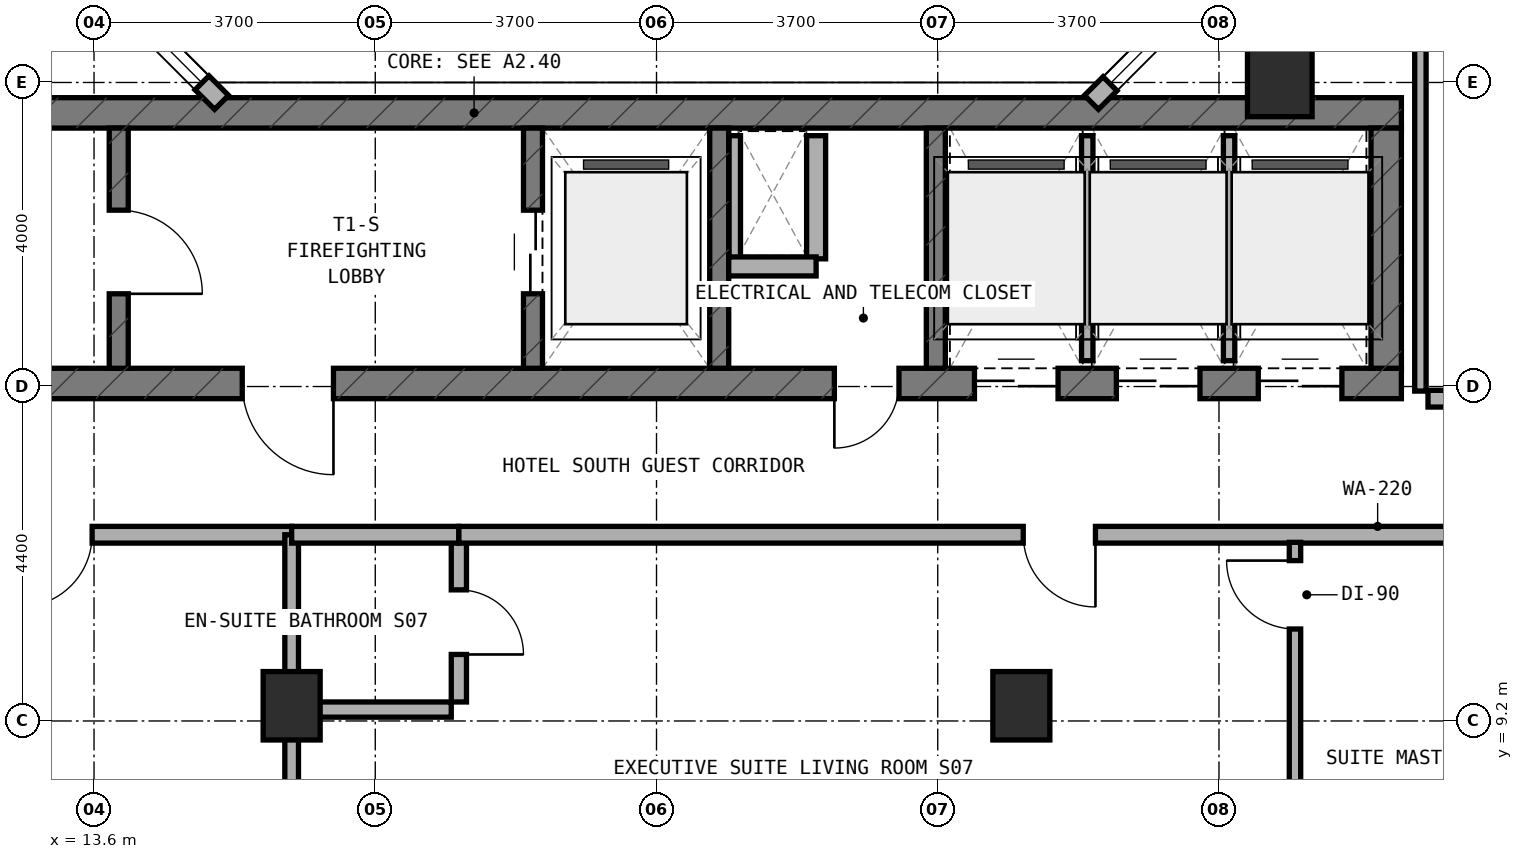
"""IFC4 building model, lengths in metres.
Left out: names, types, materials, properties, quantities, classifications, styles, units other than length and angle.
Written with IfcOpenShell. Run it as: python <this file> out.ifc"""

import sys

from ifc_helpers import new_model, si_unit, direction, frame, frame_2d, origin, origin_2d, place, context, subcontext, project, spatial, rectangle, extrude, element, fill, save


model = new_model("IFC4")
c1 = context("Model", 3, precision=1e-05, world=origin(), true_north=direction((0.0, 1.0)))
c2 = subcontext(c1, "Body", "Model", "MODEL_VIEW")
j1 = project(units=[si_unit("LENGTHUNIT", "METRE"), si_unit("PLANEANGLEUNIT", "RADIAN")], contexts=[c1])
p1 = place(None, origin())
s1 = spatial("IfcSite", under=j1, at=p1, CompositionType="ELEMENT")
p2 = place(p1, origin())
s2 = spatial("IfcBuilding", under=s1, at=p2, CompositionType="ELEMENT")
p3 = place(p2, frame((0.0, 0.0, 177.5)))
s3 = spatial("IfcBuildingStorey", under=s2, at=p3, CompositionType="ELEMENT", Elevation=177.5)
p4 = place(p3, frame((6.4, 13.64, 0.0), z_axis=(0.0, 0.0, 1.0), x_axis=(1.0, 0.0, 0.0)))
e1 = element("IfcWall", 1, at=p4, inside=s3, PredefinedType="SHEAR", context=c2, shape_type="SweptSolid", body=[
    extrude(rectangle(XDim=24.4, YDim=0.4, at=frame_2d((12.2, 0.0))), origin(), (0.0, 0.0, 1.0), 3.6),
])
p5 = place(p4, frame((9.15, 0.0, 0.0)))
e2 = element("IfcOpeningElement", 2, at=p5, cuts=e1, PredefinedType="OPENING", context=c2, shape_type="SweptSolid", body=[
    extrude(rectangle(XDim=1.2, YDim=2.15, at=frame_2d((0.6, 1.075))), frame((0.0, 0.21, 0.0), z_axis=(0.0, -1.0, 0.0), x_axis=(1.0, 0.0, 0.0)), (0.0, 0.0, 1.0), 0.42),
])
p6 = place(p4, frame((16.94, 0.0, 0.0)))
e3 = element("IfcOpeningElement", 3, at=p6, cuts=e1, PredefinedType="OPENING", context=c2, shape_type="SweptSolid", body=[
    extrude(rectangle(XDim=0.85, YDim=2.1, at=frame_2d((0.425, 1.05))), frame((0.0, 0.21, 0.0), z_axis=(0.0, -1.0, 0.0), x_axis=(1.0, 0.0, 0.0)), (0.0, 0.0, 1.0), 0.42),
])
p7 = place(p4, frame((18.783, 0.0, 0.0)))
e4 = element("IfcOpeningElement", 4, at=p7, cuts=e1, PredefinedType="OPENING", context=c2, shape_type="SweptSolid", body=[
    extrude(rectangle(XDim=1.1, YDim=2.15, at=frame_2d((0.55, 1.075))), frame((0.0, 0.21, 0.0), z_axis=(0.0, -1.0, 0.0), x_axis=(1.0, 0.0, 0.0)), (0.0, 0.0, 1.0), 0.42),
])
p8 = place(p4, frame((20.65, 0.0, 0.0)))
e5 = element("IfcOpeningElement", 5, at=p8, cuts=e1, PredefinedType="OPENING", context=c2, shape_type="SweptSolid", body=[
    extrude(rectangle(XDim=1.1, YDim=2.15, at=frame_2d((0.55, 1.075))), frame((0.0, 0.21, 0.0), z_axis=(0.0, -1.0, 0.0), x_axis=(1.0, 0.0, 0.0)), (0.0, 0.0, 1.0), 0.42),
])
p9 = place(p4, frame((22.517, 0.0, 0.0)))
e6 = element("IfcOpeningElement", 6, at=p9, cuts=e1, PredefinedType="OPENING", context=c2, shape_type="SweptSolid", body=[
    extrude(rectangle(XDim=1.1, YDim=2.15, at=frame_2d((0.55, 1.075))), frame((0.0, 0.21, 0.0), z_axis=(0.0, -1.0, 0.0), x_axis=(1.0, 0.0, 0.0)), (0.0, 0.0, 1.0), 0.42),
])
p10 = place(p3, frame((6.4, 17.2, 0.0), z_axis=(0.0, 0.0, 1.0), x_axis=(1.0, 0.0, 0.0)))
e7 = element("IfcWall", 7, at=p10, inside=s3, PredefinedType="SHEAR", context=c2, shape_type="SweptSolid", body=[
    extrude(rectangle(XDim=24.4, YDim=0.4, at=frame_2d((12.2, 0.0))), origin(), (0.0, 0.0, 1.0), 3.6),
])
p11 = place(p3, frame((30.6, 13.84, 0.0), z_axis=(0.0, 0.0, 1.0), x_axis=(0.0, 1.0, 0.0)))
e8 = element("IfcWall", 8, at=p11, inside=s3, PredefinedType="SHEAR", context=c2, shape_type="SweptSolid", body=[
    extrude(rectangle(XDim=3.16, YDim=0.4, at=frame_2d((1.58, 0.0))), origin(), (0.0, 0.0, 1.0), 3.6),
])
p12 = place(p3, frame((13.925, 13.84, 0.0), z_axis=(0.0, 0.0, 1.0), x_axis=(0.0, 1.0, 0.0)))
e9 = element("IfcWall", 9, at=p12, inside=s3, PredefinedType="STANDARD", context=c2, shape_type="SweptSolid", body=[
    extrude(rectangle(XDim=3.16, YDim=0.25, at=frame_2d((1.58, 0.0))), origin(), (0.0, 0.0, 1.0), 3.32),
])
p13 = place(p12, frame((0.98, 0.0, 0.0)))
e10 = element("IfcOpeningElement", 10, at=p13, cuts=e9, PredefinedType="OPENING", context=c2, shape_type="SweptSolid", body=[
    extrude(rectangle(XDim=1.1, YDim=2.15, at=frame_2d((0.55, 1.075))), frame((0.0, 0.135, 0.0), z_axis=(0.0, -1.0, 0.0), x_axis=(1.0, 0.0, 0.0)), (0.0, 0.0, 1.0), 0.27),
])
p14 = place(p3, frame((19.375, 13.84, 0.0), z_axis=(0.0, 0.0, 1.0), x_axis=(0.0, 1.0, 0.0)))
e11 = element("IfcWall", 11, at=p14, inside=s3, PredefinedType="STANDARD", context=c2, shape_type="SweptSolid", body=[
    extrude(rectangle(XDim=3.16, YDim=0.25, at=frame_2d((1.58, 0.0))), origin(), (0.0, 0.0, 1.0), 3.32),
])
p15 = place(p14, frame((0.98, 0.0, 0.0)))
e12 = element("IfcOpeningElement", 12, at=p15, cuts=e11, PredefinedType="OPENING", context=c2, shape_type="SweptSolid", body=[
    extrude(rectangle(XDim=1.1, YDim=2.15, at=frame_2d((0.55, 1.075))), frame((0.0, 0.135, 0.0), z_axis=(0.0, -1.0, 0.0), x_axis=(1.0, 0.0, 0.0)), (0.0, 0.0, 1.0), 0.27),
])
for number, where, z_axis, x_axis in (
    (13, (21.825, 13.84, 0.0), (0.0, 0.0, 1.0), (0.0, 1.0, 0.0)),
    (14, (24.675, 13.84, 0.0), (0.0, 0.0, 1.0), (0.0, 1.0, 0.0)),
):
    element("IfcWall", number, at=place(p3, frame(where, z_axis=z_axis, x_axis=x_axis)), inside=s3, PredefinedType="STANDARD", context=c2, shape_type="SweptSolid", body=[
        extrude(rectangle(XDim=3.16, YDim=0.25, at=frame_2d((1.58, 0.0))), origin(), (0.0, 0.0, 1.0), 3.32),
    ])
for number, where, z_axis, x_axis in (
    (15, (16.2, 9.4, 0.0), (0.0, 0.0, 1.0), (1.0, 0.0, 0.0)),
    (16, (25.8, 9.4, 0.0), (0.0, 0.0, 1.0), (1.0, 0.0, 0.0)),
):
    element("IfcColumn", number, at=place(p3, frame(where, z_axis=z_axis, x_axis=x_axis)), inside=s3, PredefinedType="COLUMN", context=c2, shape_type="SweptSolid", body=[
        extrude(rectangle(XDim=0.75, YDim=0.9, at=origin_2d()), origin(), (0.0, 0.0, 1.0), 3.6),
    ])
p16 = place(p3, frame((29.2, 17.65, 0.0), z_axis=(0.0, 0.0, 1.0), x_axis=(1.0, 0.0, 0.0)))
e17 = element("IfcColumn", 17, at=p16, inside=s3, PredefinedType="COLUMN", context=c2, shape_type="SweptSolid", body=[
    extrude(rectangle(XDim=0.85, YDim=1.0, at=origin_2d()), origin(), (0.0, 0.0, 1.0), 3.6),
])
p17 = place(p3, frame((28.485, 19.101, 0.0), z_axis=(0.0, 0.0, 1.0), x_axis=(-0.707106781187, -0.707106781187, 0.0)))
e18 = element("IfcWall", 18, at=p17, inside=s3, PredefinedType="STANDARD", context=c2, shape_type="SweptSolid", body=[
    extrude(rectangle(XDim=2.493, YDim=0.26, at=frame_2d((1.247, 0.0))), origin(), (0.0, 0.0, 1.0), 3.32),
])
p18 = place(p17, frame((0.347, 0.0, 0.85)))
e19 = element("IfcOpeningElement", 19, at=p18, cuts=e18, PredefinedType="OPENING", context=c2, shape_type="SweptSolid", body=[
    extrude(rectangle(XDim=1.8, YDim=1.5, at=frame_2d((0.9, 0.75))), frame((0.0, 0.14, 0.0), z_axis=(0.0, -1.0, 0.0), x_axis=(1.0, 0.0, 0.0)), (0.0, 0.0, 1.0), 0.28),
])
p19 = place(p3, frame((15.278, 17.338, 0.0), z_axis=(0.0, 0.0, 1.0), x_axis=(-0.707106781187, 0.707106781187, 0.0)))
e20 = element("IfcWall", 20, at=p19, inside=s3, PredefinedType="STANDARD", context=c2, shape_type="SweptSolid", body=[
    extrude(rectangle(XDim=2.529, YDim=0.26, at=frame_2d((1.264, 0.0))), origin(), (0.0, 0.0, 1.0), 3.32),
])
p20 = place(p19, frame((0.364, 0.0, 0.85)))
e21 = element("IfcOpeningElement", 21, at=p20, cuts=e20, PredefinedType="OPENING", context=c2, shape_type="SweptSolid", body=[
    extrude(rectangle(XDim=1.8, YDim=1.5, at=frame_2d((0.9, 0.75))), frame((0.0, 0.14, 0.0), z_axis=(0.0, -1.0, 0.0), x_axis=(1.0, 0.0, 0.0)), (0.0, 0.0, 1.0), 0.28),
])
p21 = place(p3, frame((22.03, 15.28, 0.0), z_axis=(0.0, 0.0, 1.0), x_axis=(0.0, 1.0, 0.0)))
e22 = element("IfcWall", 22, at=p21, inside=s3, PredefinedType="PARTITIONING", context=c2, shape_type="SweptSolid", body=[
    extrude(rectangle(XDim=1.62, YDim=0.15, at=frame_2d((0.81, 0.0))), origin(), (0.0, 0.0, 1.0), 3.32),
])
p22 = place(p3, frame((23.1, 15.28, 0.0), z_axis=(0.0, 0.0, 1.0), x_axis=(0.0, 1.0, 0.0)))
e23 = element("IfcWall", 23, at=p22, inside=s3, PredefinedType="SOLIDWALL", context=c2, shape_type="SweptSolid", body=[
    extrude(rectangle(XDim=1.62, YDim=0.25, at=frame_2d((0.81, 0.0))), origin(), (0.0, 0.0, 1.0), 3.32),
])
p23 = place(p3, frame((21.95, 15.18, 0.0), z_axis=(0.0, 0.0, 1.0), x_axis=(1.0, 0.0, 0.0)))
e24 = element("IfcWall", 24, at=p23, inside=s3, PredefinedType="SOLIDWALL", context=c2, shape_type="SweptSolid", body=[
    extrude(rectangle(XDim=1.15, YDim=0.25, at=frame_2d((0.575, 0.0))), origin(), (0.0, 0.0, 1.0), 3.32),
])
p24 = place(p3, frame((26.667, 13.94, 0.0), z_axis=(0.0, 0.0, 1.0), x_axis=(0.0, 1.0, 0.0)))
e25 = element("IfcWall", 25, at=p24, inside=s3, PredefinedType="PARTITIONING", context=c2, shape_type="SweptSolid", body=[
    extrude(rectangle(XDim=2.96, YDim=0.15, at=frame_2d((1.48, 0.0))), origin(), (0.0, 0.0, 1.0), 3.32),
])
p25 = place(p3, frame((28.533, 13.94, 0.0), z_axis=(0.0, 0.0, 1.0), x_axis=(0.0, 1.0, 0.0)))
e26 = element("IfcWall", 26, at=p25, inside=s3, PredefinedType="PARTITIONING", context=c2, shape_type="SweptSolid", body=[
    extrude(rectangle(XDim=2.96, YDim=0.15, at=frame_2d((1.48, 0.0))), origin(), (0.0, 0.0, 1.0), 2.995),
])
p26 = place(p3, frame((10.0, 11.65, 0.0), z_axis=(0.0, 0.0, 1.0), x_axis=(1.0, 0.0, 0.0)))
e27 = element("IfcWall", 27, at=p26, inside=s3, PredefinedType="SOLIDWALL", context=c2, shape_type="SweptSolid", body=[
    extrude(rectangle(XDim=6.2, YDim=0.22, at=frame_2d((3.1, 0.0))), origin(), (0.0, 0.0, 1.0), 2.995),
])
p27 = place(p26, frame((2.625, 0.0, 0.0)))
e28 = element("IfcOpeningElement", 28, at=p27, cuts=e27, PredefinedType="OPENING", context=c2, shape_type="SweptSolid", body=[
    extrude(rectangle(XDim=0.95, YDim=2.1, at=frame_2d((0.475, 1.05))), frame((0.0, 0.12, 0.0), z_axis=(0.0, -1.0, 0.0), x_axis=(1.0, 0.0, 0.0)), (0.0, 0.0, 1.0), 0.24),
])
p28 = place(p3, frame((16.2, 5.46, 0.0), z_axis=(0.0, 0.0, 1.0), x_axis=(0.0, 1.0, 0.0)))
e29 = element("IfcWall", 29, at=p28, inside=s3, PredefinedType="SOLIDWALL", context=c2, shape_type="SweptSolid", body=[
    extrude(rectangle(XDim=6.19, YDim=0.18, at=frame_2d((3.095, 0.0))), origin(), (0.0, 0.0, 1.0), 2.935),
])
p29 = place(p3, frame((18.4, 9.45, 0.0), z_axis=(0.0, 0.0, 1.0), x_axis=(0.0, 1.0, 0.0)))
e30 = element("IfcWall", 30, at=p29, inside=s3, PredefinedType="PLUMBINGWALL", context=c2, shape_type="SweptSolid", body=[
    extrude(rectangle(XDim=2.1, YDim=0.2, at=frame_2d((1.05, 0.0))), origin(), (0.0, 0.0, 1.0), 2.845),
])
p30 = place(p29, frame((0.625, 0.0, 0.0)))
e31 = element("IfcOpeningElement", 31, at=p30, cuts=e30, PredefinedType="OPENING", context=c2, shape_type="SweptSolid", body=[
    extrude(rectangle(XDim=0.85, YDim=2.1, at=frame_2d((0.425, 1.05))), frame((0.0, 0.11, 0.0), z_axis=(0.0, -1.0, 0.0), x_axis=(1.0, 0.0, 0.0)), (0.0, 0.0, 1.0), 0.22),
])
p31 = place(p3, frame((16.3, 9.35, 0.0), z_axis=(0.0, 0.0, 1.0), x_axis=(1.0, 0.0, 0.0)))
e32 = element("IfcWall", 32, at=p31, inside=s3, PredefinedType="PLUMBINGWALL", context=c2, shape_type="SweptSolid", body=[
    extrude(rectangle(XDim=2.0, YDim=0.2, at=frame_2d((1.0, 0.0))), origin(), (0.0, 0.0, 1.0), 2.935),
])
p32 = place(p3, frame((16.2, 11.65, 0.0), z_axis=(0.0, 0.0, 1.0), x_axis=(1.0, 0.0, 0.0)))
e33 = element("IfcWall", 33, at=p32, inside=s3, PredefinedType="SOLIDWALL", context=c2, shape_type="SweptSolid", body=[
    extrude(rectangle(XDim=2.2, YDim=0.22, at=frame_2d((1.1, 0.0))), origin(), (0.0, 0.0, 1.0), 2.995),
])
p33 = place(p3, frame((18.4, 11.65, 0.0), z_axis=(0.0, 0.0, 1.0), x_axis=(1.0, 0.0, 0.0)))
e34 = element("IfcWall", 34, at=p33, inside=s3, PredefinedType="SOLIDWALL", context=c2, shape_type="SweptSolid", body=[
    extrude(rectangle(XDim=15.8, YDim=0.22, at=frame_2d((7.9, 0.0))), origin(), (0.0, 0.0, 1.0), 2.995),
])
p34 = place(p33, frame((7.425, 0.0, 0.0)))
e35 = element("IfcOpeningElement", 35, at=p34, cuts=e34, PredefinedType="OPENING", context=c2, shape_type="SweptSolid", body=[
    extrude(rectangle(XDim=0.95, YDim=2.1, at=frame_2d((0.475, 1.05))), frame((0.0, 0.12, 0.0), z_axis=(0.0, -1.0, 0.0), x_axis=(1.0, 0.0, 0.0)), (0.0, 0.0, 1.0), 0.24),
])
p35 = place(p3, frame((29.4, 6.047, 0.0), z_axis=(0.0, 0.0, 1.0), x_axis=(0.0, 1.0, 0.0)))
e36 = element("IfcWall", 36, at=p35, inside=s3, PredefinedType="PARTITIONING", context=c2, shape_type="SweptSolid", body=[
    extrude(rectangle(XDim=5.503, YDim=0.15, at=frame_2d((2.751, 0.0))), origin(), (0.0, 0.0, 1.0), 2.845),
])
p36 = place(p35, frame((4.363, 0.0, 0.0)))
e37 = element("IfcOpeningElement", 37, at=p36, cuts=e36, PredefinedType="OPENING", context=c2, shape_type="SweptSolid", body=[
    extrude(rectangle(XDim=0.9, YDim=2.1, at=frame_2d((0.45, 1.05))), frame((0.0, 0.085, 0.0), z_axis=(0.0, -1.0, 0.0), x_axis=(1.0, 0.0, 0.0)), (0.0, 0.0, 1.0), 0.17),
])
p37 = place(p3, frame((31.05, 13.54, 0.0), z_axis=(0.0, 0.0, 1.0), x_axis=(0.0, 1.0, 0.0)))
e38 = element("IfcWall", 38, at=p37, inside=s3, PredefinedType="PARTITIONING", context=c2, shape_type="SweptSolid", body=[
    extrude(rectangle(XDim=6.66, YDim=0.15, at=frame_2d((3.33, 0.0))), origin(), (0.0, 0.0, 1.0), 2.995),
])
p38 = place(p3, frame((31.15, 13.44, 0.0), z_axis=(0.0, 0.0, 1.0), x_axis=(1.0, 0.0, 0.0)))
e39 = element("IfcWall", 39, at=p38, inside=s3, PredefinedType="SOLIDWALL", context=c2, shape_type="SweptSolid", body=[
    extrude(rectangle(XDim=9.15, YDim=0.22, at=frame_2d((4.575, 0.0))), origin(), (0.0, 0.0, 1.0), 2.935),
])
p39 = place(p38, frame((3.612, 0.0, 0.0)))
e40 = element("IfcOpeningElement", 40, at=p39, cuts=e39, PredefinedType="OPENING", context=c2, shape_type="SweptSolid", body=[
    extrude(rectangle(XDim=1.1, YDim=2.1, at=frame_2d((0.55, 1.05))), frame((0.0, 0.12, 0.0), z_axis=(0.0, -1.0, 0.0), x_axis=(1.0, 0.0, 0.0)), (0.0, 0.0, 1.0), 0.24),
])
p40 = place(p18, origin())
e41 = element("IfcWindow", 41, at=p40, inside=s3, PartitioningType="SINGLE_PANEL", PredefinedType="WINDOW", context=c2, shape_type="SweptSolid", body=[
    extrude(rectangle(XDim=1.8, YDim=1.5, at=frame_2d((0.9, 0.75))), frame((0.0, 0.03, 0.0), z_axis=(0.0, -1.0, 0.0), x_axis=(1.0, 0.0, 0.0)), (0.0, 0.0, 1.0), 0.06),
])
fill(e19, e41)
p41 = place(p20, origin())
e42 = element("IfcWindow", 42, at=p41, inside=s3, PartitioningType="SINGLE_PANEL", PredefinedType="WINDOW", context=c2, shape_type="SweptSolid", body=[
    extrude(rectangle(XDim=1.8, YDim=1.5, at=frame_2d((0.9, 0.75))), frame((0.0, 0.03, 0.0), z_axis=(0.0, -1.0, 0.0), x_axis=(1.0, 0.0, 0.0)), (0.0, 0.0, 1.0), 0.06),
])
fill(e21, e42)
p42 = place(p13, frame((1.1, 0.0, 0.0), z_axis=(0.0, 0.0, 1.0), x_axis=(-1.0, 0.0, 0.0)))
e43 = element("IfcDoor", 43, at=p42, inside=s3, OperationType="SINGLE_SWING_RIGHT", PredefinedType="DOOR", context=c2, shape_type="SweptSolid", body=[
    extrude(rectangle(XDim=1.1, YDim=2.15, at=frame_2d((0.55, 1.075))), frame((0.0, 0.025, 0.0), z_axis=(0.0, -1.0, 0.0), x_axis=(1.0, 0.0, 0.0)), (0.0, 0.0, 1.0), 0.05),
])
fill(e10, e43)
p43 = place(p5, frame((1.2, 0.0, 0.0), z_axis=(0.0, 0.0, 1.0), x_axis=(-1.0, 0.0, 0.0)))
e44 = element("IfcDoor", 44, at=p43, inside=s3, OperationType="SINGLE_SWING_LEFT", PredefinedType="DOOR", context=c2, shape_type="SweptSolid", body=[
    extrude(rectangle(XDim=1.2, YDim=2.15, at=frame_2d((0.6, 1.075))), frame((0.0, 0.025, 0.0), z_axis=(0.0, -1.0, 0.0), x_axis=(1.0, 0.0, 0.0)), (0.0, 0.0, 1.0), 0.05),
])
fill(e2, e44)
p44 = place(p15, origin())
e45 = element("IfcDoor", 45, at=p44, inside=s3, OperationType="DOUBLE_DOOR_SLIDING", PredefinedType="DOOR", context=c2, shape_type="SweptSolid", body=[
    extrude(rectangle(XDim=1.1, YDim=2.15, at=frame_2d((0.55, 1.075))), frame((0.0, 0.025, 0.0), z_axis=(0.0, -1.0, 0.0), x_axis=(1.0, 0.0, 0.0)), (0.0, 0.0, 1.0), 0.05),
])
fill(e12, e45)
p45 = place(p6, frame((0.85, 0.0, 0.0), z_axis=(0.0, 0.0, 1.0), x_axis=(-1.0, 0.0, 0.0)))
e46 = element("IfcDoor", 46, at=p45, inside=s3, OperationType="SINGLE_SWING_RIGHT", PredefinedType="DOOR", context=c2, shape_type="SweptSolid", body=[
    extrude(rectangle(XDim=0.85, YDim=2.1, at=frame_2d((0.425, 1.05))), frame((0.0, 0.025, 0.0), z_axis=(0.0, -1.0, 0.0), x_axis=(1.0, 0.0, 0.0)), (0.0, 0.0, 1.0), 0.05),
])
fill(e3, e46)
p46 = place(p7, frame((1.1, 0.0, 0.0), z_axis=(0.0, 0.0, 1.0), x_axis=(-1.0, 0.0, 0.0)))
e47 = element("IfcDoor", 47, at=p46, inside=s3, OperationType="DOUBLE_DOOR_SLIDING", PredefinedType="DOOR", context=c2, shape_type="SweptSolid", body=[
    extrude(rectangle(XDim=1.1, YDim=2.15, at=frame_2d((0.55, 1.075))), frame((0.0, 0.025, 0.0), z_axis=(0.0, -1.0, 0.0), x_axis=(1.0, 0.0, 0.0)), (0.0, 0.0, 1.0), 0.05),
])
fill(e4, e47)
p47 = place(p8, frame((1.1, 0.0, 0.0), z_axis=(0.0, 0.0, 1.0), x_axis=(-1.0, 0.0, 0.0)))
e48 = element("IfcDoor", 48, at=p47, inside=s3, OperationType="DOUBLE_DOOR_SLIDING", PredefinedType="DOOR", context=c2, shape_type="SweptSolid", body=[
    extrude(rectangle(XDim=1.1, YDim=2.15, at=frame_2d((0.55, 1.075))), frame((0.0, 0.025, 0.0), z_axis=(0.0, -1.0, 0.0), x_axis=(1.0, 0.0, 0.0)), (0.0, 0.0, 1.0), 0.05),
])
fill(e5, e48)
p48 = place(p9, frame((1.1, 0.0, 0.0), z_axis=(0.0, 0.0, 1.0), x_axis=(-1.0, 0.0, 0.0)))
e49 = element("IfcDoor", 49, at=p48, inside=s3, OperationType="DOUBLE_DOOR_SLIDING", PredefinedType="DOOR", context=c2, shape_type="SweptSolid", body=[
    extrude(rectangle(XDim=1.1, YDim=2.15, at=frame_2d((0.55, 1.075))), frame((0.0, 0.025, 0.0), z_axis=(0.0, -1.0, 0.0), x_axis=(1.0, 0.0, 0.0)), (0.0, 0.0, 1.0), 0.05),
])
fill(e6, e49)
p49 = place(p27, frame((0.95, 0.0, 0.0), z_axis=(0.0, 0.0, 1.0), x_axis=(-1.0, 0.0, 0.0)))
e50 = element("IfcDoor", 50, at=p49, inside=s3, OperationType="SINGLE_SWING_RIGHT", PredefinedType="DOOR", context=c2, shape_type="SweptSolid", body=[
    extrude(rectangle(XDim=0.95, YDim=2.1, at=frame_2d((0.475, 1.05))), frame((0.0, 0.025, 0.0), z_axis=(0.0, -1.0, 0.0), x_axis=(1.0, 0.0, 0.0)), (0.0, 0.0, 1.0), 0.05),
])
fill(e28, e50)
p50 = place(p30, frame((0.85, 0.0, 0.0), z_axis=(0.0, 0.0, 1.0), x_axis=(-1.0, 0.0, 0.0)))
e51 = element("IfcDoor", 51, at=p50, inside=s3, OperationType="SINGLE_SWING_RIGHT", PredefinedType="DOOR", context=c2, shape_type="SweptSolid", body=[
    extrude(rectangle(XDim=0.85, YDim=2.1, at=frame_2d((0.425, 1.05))), frame((0.0, 0.025, 0.0), z_axis=(0.0, -1.0, 0.0), x_axis=(1.0, 0.0, 0.0)), (0.0, 0.0, 1.0), 0.05),
])
fill(e31, e51)
p51 = place(p34, frame((0.95, 0.0, 0.0), z_axis=(0.0, 0.0, 1.0), x_axis=(-1.0, 0.0, 0.0)))
e52 = element("IfcDoor", 52, at=p51, inside=s3, OperationType="SINGLE_SWING_LEFT", PredefinedType="DOOR", context=c2, shape_type="SweptSolid", body=[
    extrude(rectangle(XDim=0.95, YDim=2.1, at=frame_2d((0.475, 1.05))), frame((0.0, 0.025, 0.0), z_axis=(0.0, -1.0, 0.0), x_axis=(1.0, 0.0, 0.0)), (0.0, 0.0, 1.0), 0.05),
])
fill(e35, e52)
p52 = place(p36, origin())
e53 = element("IfcDoor", 53, at=p52, inside=s3, OperationType="SINGLE_SWING_RIGHT", PredefinedType="DOOR", context=c2, shape_type="SweptSolid", body=[
    extrude(rectangle(XDim=0.9, YDim=2.1, at=frame_2d((0.45, 1.05))), frame((0.0, 0.025, 0.0), z_axis=(0.0, -1.0, 0.0), x_axis=(1.0, 0.0, 0.0)), (0.0, 0.0, 1.0), 0.05),
])
fill(e37, e53)
save(model, sys.argv[1])
